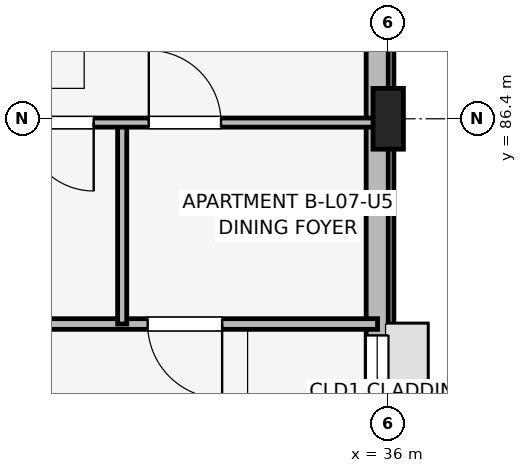
"""IFC4 building model, lengths in metres.
Left out: names, types, materials, properties, quantities, classifications, styles, units other than length and angle.
Written with IfcOpenShell. Run it as: python <this file> out.ifc"""

import sys

from ifc_helpers import new_model, si_unit, direction, frame, frame_2d, origin, origin_2d, place, context, subcontext, project, spatial, rectangle, extrude, element, fill, save


model = new_model("IFC4")
c1 = context("Model", 3, precision=1e-05, world=origin(), true_north=direction((0.0, 1.0)))
c2 = subcontext(c1, "Body", "Model", "MODEL_VIEW")
j1 = project(units=[si_unit("LENGTHUNIT", "METRE"), si_unit("PLANEANGLEUNIT", "RADIAN")], contexts=[c1])
p1 = place(None, origin())
s1 = spatial("IfcSite", under=j1, at=p1, CompositionType="ELEMENT")
p2 = place(p1, origin())
s2 = spatial("IfcBuilding", under=s1, at=p2, CompositionType="ELEMENT")
p3 = place(p2, frame((0.0, 0.0, 24.45)))
s3 = spatial("IfcBuildingStorey", under=s2, at=p3, CompositionType="ELEMENT", Elevation=24.45)
p4 = place(p3, frame((36.0, 86.4, 0.0), z_axis=(0.0, 0.0, 1.0), x_axis=(1.0, 0.0, 0.0)))
e1 = element("IfcColumn", 1, at=p4, inside=s3, PredefinedType="COLUMN", context=c2, shape_type="SweptSolid", body=[
    extrude(rectangle(XDim=0.4, YDim=0.8, at=origin_2d()), origin(), (0.0, 0.0, 1.0), 3.15),
])
p5 = place(p3, frame((35.855, 75.2, 0.0), z_axis=(0.0, 0.0, 1.0), x_axis=(0.0, 1.0, 0.0)))
e2 = element("IfcWall", 2, at=p5, inside=s3, PredefinedType="SOLIDWALL", context=c2, shape_type="SweptSolid", body=[
    extrude(rectangle(XDim=15.2, YDim=0.29, at=frame_2d((7.6, 0.0))), origin(), (0.0, 0.0, 1.0), 2.43),
])
p6 = place(p5, frame((6.85, 0.0, 1.05)))
e3 = element("IfcOpeningElement", 3, at=p6, cuts=e2, PredefinedType="OPENING", context=c2, shape_type="SweptSolid", body=[
    extrude(rectangle(XDim=1.5, YDim=1.15, at=frame_2d((0.75, 0.575))), frame((0.0, 0.155, 0.0), z_axis=(0.0, -1.0, 0.0), x_axis=(1.0, 0.0, 0.0)), (0.0, 0.0, 1.0), 0.31),
])
p7 = place(p5, frame((12.665, 0.0, 0.75)))
e4 = element("IfcOpeningElement", 4, at=p7, cuts=e2, PredefinedType="OPENING", context=c2, shape_type="SweptSolid", body=[
    extrude(rectangle(XDim=1.3, YDim=1.55, at=frame_2d((0.65, 0.775))), frame((0.0, 0.155, 0.0), z_axis=(0.0, -1.0, 0.0), x_axis=(1.0, 0.0, 0.0)), (0.0, 0.0, 1.0), 0.31),
])
p8 = place(p3, frame((28.94, 83.7, 0.0), z_axis=(0.0, 0.0, 1.0), x_axis=(1.0, 0.0, 0.0)))
e5 = element("IfcWall", 5, at=p8, inside=s3, PredefinedType="PARTITIONING", context=c2, shape_type="SweptSolid", body=[
    extrude(rectangle(XDim=6.92, YDim=0.14, at=frame_2d((3.46, 0.0))), origin(), (0.0, 0.0, 1.0), 2.38),
])
p9 = place(p8, frame((4.875, 0.0, 0.0), z_axis=(0.0, 0.0, 1.0), x_axis=(-1.0, 0.0, 0.0)))
e6 = element("IfcOpeningElement", 6, at=p9, cuts=e5, PredefinedType="OPENING", context=c2, shape_type="SweptSolid", body=[
    extrude(rectangle(XDim=0.98, YDim=2.1, at=frame_2d((0.49, 1.05))), frame((0.0, 0.08, 0.0), z_axis=(0.0, -1.0, 0.0), x_axis=(1.0, 0.0, 0.0)), (0.0, 0.0, 1.0), 0.16),
])
p10 = place(p3, frame((32.5, 83.7, 0.0), z_axis=(0.0, 0.0, 1.0), x_axis=(0.0, 1.0, 0.0)))
e7 = element("IfcWall", 7, at=p10, inside=s3, PredefinedType="PARTITIONING", context=c2, shape_type="SweptSolid", body=[
    extrude(rectangle(XDim=2.65, YDim=0.12, at=frame_2d((1.325, 0.0))), origin(), (0.0, 0.0, 1.0), 2.38),
])
p11 = place(p3, frame((28.94, 86.35, 0.0), z_axis=(0.0, 0.0, 1.0), x_axis=(1.0, 0.0, 0.0)))
e8 = element("IfcWall", 8, at=p11, inside=s3, PredefinedType="PARTITIONING", context=c2, shape_type="SweptSolid", body=[
    extrude(rectangle(XDim=6.92, YDim=0.12, at=frame_2d((3.46, 0.0))), origin(), (0.0, 0.0, 1.0), 2.38),
])
p12 = place(p11, frame((0.53, 0.0, 0.0)))
e9 = element("IfcOpeningElement", 9, at=p12, cuts=e8, PredefinedType="OPENING", context=c2, shape_type="SweptSolid", body=[
    extrude(rectangle(XDim=0.85, YDim=2.08, at=frame_2d((0.425, 1.04))), frame((0.0, 0.07, 0.0), z_axis=(0.0, -1.0, 0.0), x_axis=(1.0, 0.0, 0.0)), (0.0, 0.0, 1.0), 0.14),
])
p13 = place(p11, frame((3.185, 0.0, 0.0), z_axis=(0.0, 0.0, 1.0), x_axis=(-1.0, 0.0, 0.0)))
e10 = element("IfcOpeningElement", 10, at=p13, cuts=e8, PredefinedType="OPENING", context=c2, shape_type="SweptSolid", body=[
    extrude(rectangle(XDim=0.9, YDim=2.08, at=frame_2d((0.45, 1.04))), frame((0.0, 0.07, 0.0), z_axis=(0.0, -1.0, 0.0), x_axis=(1.0, 0.0, 0.0)), (0.0, 0.0, 1.0), 0.14),
])
p14 = place(p11, frame((3.91, 0.0, 0.0)))
e11 = element("IfcOpeningElement", 11, at=p14, cuts=e8, PredefinedType="OPENING", context=c2, shape_type="SweptSolid", body=[
    extrude(rectangle(XDim=0.95, YDim=2.08, at=frame_2d((0.475, 1.04))), frame((0.0, 0.07, 0.0), z_axis=(0.0, -1.0, 0.0), x_axis=(1.0, 0.0, 0.0)), (0.0, 0.0, 1.0), 0.14),
])
p15 = place(p6, origin())
e12 = element("IfcWindow", 12, at=p15, inside=s3, PartitioningType="SINGLE_PANEL", PredefinedType="WINDOW", context=c2, shape_type="SweptSolid", body=[
    extrude(rectangle(XDim=1.5, YDim=1.15, at=frame_2d((0.75, 0.575))), frame((0.0, 0.03, 0.0), z_axis=(0.0, -1.0, 0.0), x_axis=(1.0, 0.0, 0.0)), (0.0, 0.0, 1.0), 0.06),
])
fill(e3, e12)
p16 = place(p9, origin())
e13 = element("IfcDoor", 13, at=p16, inside=s3, OperationType="SINGLE_SWING_RIGHT", PredefinedType="DOOR", context=c2, shape_type="SweptSolid", body=[
    extrude(rectangle(XDim=0.98, YDim=2.1, at=frame_2d((0.49, 1.05))), frame((0.0, 0.025, 0.0), z_axis=(0.0, -1.0, 0.0), x_axis=(1.0, 0.0, 0.0)), (0.0, 0.0, 1.0), 0.05),
])
fill(e6, e13)
p17 = place(p13, origin())
e14 = element("IfcDoor", 14, at=p17, inside=s3, OperationType="SINGLE_SWING_RIGHT", PredefinedType="DOOR", context=c2, shape_type="SweptSolid", body=[
    extrude(rectangle(XDim=0.9, YDim=2.08, at=frame_2d((0.45, 1.04))), frame((0.0, 0.025, 0.0), z_axis=(0.0, -1.0, 0.0), x_axis=(1.0, 0.0, 0.0)), (0.0, 0.0, 1.0), 0.05),
])
fill(e10, e14)
p18 = place(p14, origin())
e15 = element("IfcDoor", 15, at=p18, inside=s3, OperationType="SINGLE_SWING_LEFT", PredefinedType="DOOR", context=c2, shape_type="SweptSolid", body=[
    extrude(rectangle(XDim=0.95, YDim=2.08, at=frame_2d((0.475, 1.04))), frame((0.0, 0.025, 0.0), z_axis=(0.0, -1.0, 0.0), x_axis=(1.0, 0.0, 0.0)), (0.0, 0.0, 1.0), 0.05),
])
fill(e11, e15)
save(model, sys.argv[1])
